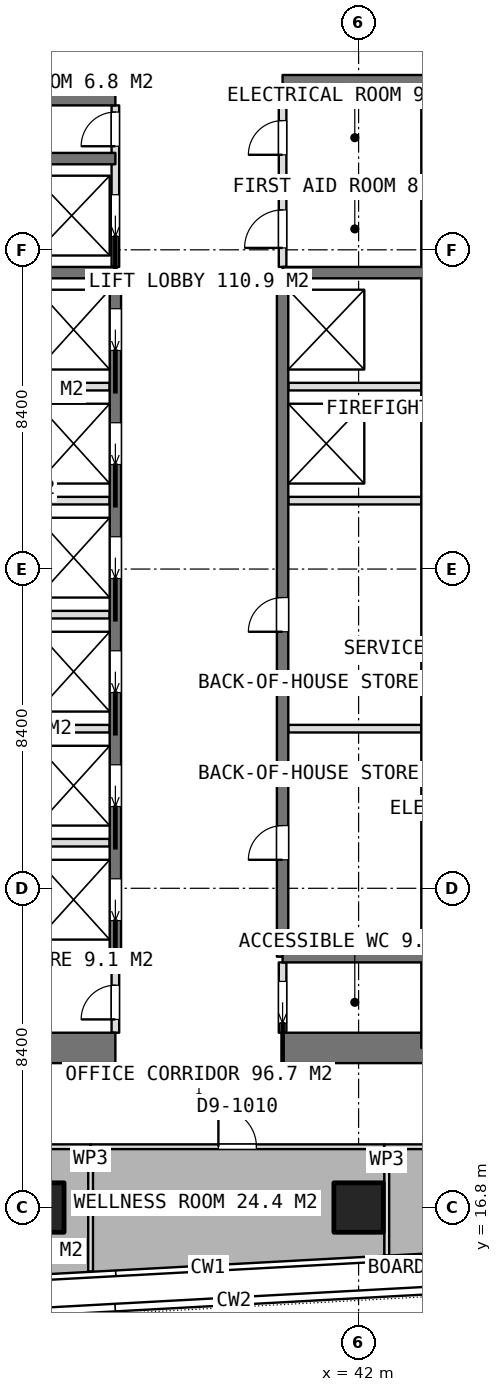
"""IFC4 building model, lengths in metres.
Left out: names, types, materials, properties, quantities, classifications, styles, units other than length and angle.
Written with IfcOpenShell. Run it as: python <this file> out.ifc"""

import sys

from ifc_helpers import new_model, si_unit, direction, frame, frame_2d, origin, origin_2d, place, context, subcontext, project, spatial, rectangle, extrude, element, fill, save


model = new_model("IFC4")
c1 = context("Model", 3, precision=1e-05, world=origin(), true_north=direction((0.0, 1.0)))
c2 = subcontext(c1, "Body", "Model", "MODEL_VIEW")
j1 = project(units=[si_unit("LENGTHUNIT", "METRE"), si_unit("PLANEANGLEUNIT", "RADIAN")], contexts=[c1])
p1 = place(None, origin())
s1 = spatial("IfcSite", under=j1, at=p1, CompositionType="ELEMENT")
p2 = place(p1, origin())
s2 = spatial("IfcBuilding", under=s1, at=p2, CompositionType="ELEMENT")
p3 = place(p2, frame((0.0, 0.0, 272.6)))
s3 = spatial("IfcBuildingStorey", under=s2, at=p3, CompositionType="ELEMENT", Elevation=272.6)
p4 = place(p3, frame((25.2, 21.0, 0.0), z_axis=(0.0, 0.0, 1.0), x_axis=(1.0, 0.0, 0.0)))
e1 = element("IfcWall", 1, at=p4, inside=s3, PredefinedType="SHEAR", context=c2, shape_type="SweptSolid", body=[
    extrude(rectangle(XDim=10.4, YDim=0.8, at=frame_2d((5.2, 0.0))), origin(), (0.0, 0.0, 1.0), 3.75),
])
p5 = place(p3, frame((40.0, 21.0, 0.0), z_axis=(0.0, 0.0, 1.0), x_axis=(1.0, 0.0, 0.0)))
e2 = element("IfcWall", 2, at=p5, inside=s3, PredefinedType="SHEAR", context=c2, shape_type="SweptSolid", body=[
    extrude(rectangle(XDim=10.4, YDim=0.8, at=frame_2d((5.2, 0.0))), origin(), (0.0, 0.0, 1.0), 3.75),
])
p6 = place(p3, frame((25.2, 46.2, 0.0), z_axis=(0.0, 0.0, 1.0), x_axis=(1.0, 0.0, 0.0)))
e3 = element("IfcWall", 3, at=p6, inside=s3, PredefinedType="SHEAR", context=c2, shape_type="SweptSolid", body=[
    extrude(rectangle(XDim=10.4, YDim=0.8, at=frame_2d((5.2, 0.0))), origin(), (0.0, 0.0, 1.0), 3.75),
])
p7 = place(p3, frame((40.0, 46.2, 0.0), z_axis=(0.0, 0.0, 1.0), x_axis=(1.0, 0.0, 0.0)))
e4 = element("IfcWall", 4, at=p7, inside=s3, PredefinedType="SHEAR", context=c2, shape_type="SweptSolid", body=[
    extrude(rectangle(XDim=10.4, YDim=0.8, at=frame_2d((5.2, 0.0))), origin(), (0.0, 0.0, 1.0), 3.75),
])
p8 = place(p3, frame((43.8, 21.0, 0.0), z_axis=(0.0, 0.0, 1.0), x_axis=(0.0, 1.0, 0.0)))
e5 = element("IfcWall", 5, at=p8, inside=s3, PredefinedType="SHEAR", context=c2, shape_type="SweptSolid", body=[
    extrude(rectangle(XDim=25.2, YDim=0.3, at=frame_2d((12.6, 0.0))), origin(), (0.0, 0.0, 1.0), 3.75),
])
p9 = place(p3, frame((35.6, 23.4, 0.0), z_axis=(0.0, 0.0, 1.0), x_axis=(0.0, 1.0, 0.0)))
e6 = element("IfcWall", 6, at=p9, inside=s3, PredefinedType="SHEAR", context=c2, shape_type="SweptSolid", body=[
    extrude(rectangle(XDim=18.0, YDim=0.3, at=frame_2d((9.0, 0.0))), origin(), (0.0, 0.0, 1.0), 3.75),
])
p10 = place(p9, frame((0.95, 0.0, 0.0)))
e7 = element("IfcOpeningElement", 7, at=p10, cuts=e6, PredefinedType="OPENING", context=c2, shape_type="SweptSolid", body=[
    extrude(rectangle(XDim=1.1, YDim=2.1, at=frame_2d((0.55, 1.05))), frame((0.0, 0.16, 0.0), z_axis=(0.0, -1.0, 0.0), x_axis=(1.0, 0.0, 0.0)), (0.0, 0.0, 1.0), 0.32),
])
p11 = place(p9, frame((3.95, 0.0, 0.0)))
e8 = element("IfcOpeningElement", 8, at=p11, cuts=e6, PredefinedType="OPENING", context=c2, shape_type="SweptSolid", body=[
    extrude(rectangle(XDim=1.1, YDim=2.1, at=frame_2d((0.55, 1.05))), frame((0.0, 0.16, 0.0), z_axis=(0.0, -1.0, 0.0), x_axis=(1.0, 0.0, 0.0)), (0.0, 0.0, 1.0), 0.32),
])
p12 = place(p9, frame((6.95, 0.0, 0.0)))
e9 = element("IfcOpeningElement", 9, at=p12, cuts=e6, PredefinedType="OPENING", context=c2, shape_type="SweptSolid", body=[
    extrude(rectangle(XDim=1.1, YDim=2.1, at=frame_2d((0.55, 1.05))), frame((0.0, 0.16, 0.0), z_axis=(0.0, -1.0, 0.0), x_axis=(1.0, 0.0, 0.0)), (0.0, 0.0, 1.0), 0.32),
])
p13 = place(p9, frame((9.95, 0.0, 0.0)))
e10 = element("IfcOpeningElement", 10, at=p13, cuts=e6, PredefinedType="OPENING", context=c2, shape_type="SweptSolid", body=[
    extrude(rectangle(XDim=1.1, YDim=2.1, at=frame_2d((0.55, 1.05))), frame((0.0, 0.16, 0.0), z_axis=(0.0, -1.0, 0.0), x_axis=(1.0, 0.0, 0.0)), (0.0, 0.0, 1.0), 0.32),
])
p14 = place(p9, frame((12.95, 0.0, 0.0)))
e11 = element("IfcOpeningElement", 11, at=p14, cuts=e6, PredefinedType="OPENING", context=c2, shape_type="SweptSolid", body=[
    extrude(rectangle(XDim=1.1, YDim=2.1, at=frame_2d((0.55, 1.05))), frame((0.0, 0.16, 0.0), z_axis=(0.0, -1.0, 0.0), x_axis=(1.0, 0.0, 0.0)), (0.0, 0.0, 1.0), 0.32),
])
p15 = place(p9, frame((15.95, 0.0, 0.0)))
e12 = element("IfcOpeningElement", 12, at=p15, cuts=e6, PredefinedType="OPENING", context=c2, shape_type="SweptSolid", body=[
    extrude(rectangle(XDim=1.1, YDim=2.1, at=frame_2d((0.55, 1.05))), frame((0.0, 0.16, 0.0), z_axis=(0.0, -1.0, 0.0), x_axis=(1.0, 0.0, 0.0)), (0.0, 0.0, 1.0), 0.32),
])
p16 = place(p3, frame((40.0, 23.4, 0.0), z_axis=(0.0, 0.0, 1.0), x_axis=(0.0, 1.0, 0.0)))
e13 = element("IfcWall", 13, at=p16, inside=s3, PredefinedType="SHEAR", context=c2, shape_type="SweptSolid", body=[
    extrude(rectangle(XDim=18.0, YDim=0.3, at=frame_2d((9.0, 0.0))), origin(), (0.0, 0.0, 1.0), 3.75),
])
p17 = place(p16, frame((2.55, 0.0, 0.0)))
e14 = element("IfcOpeningElement", 14, at=p17, cuts=e13, PredefinedType="OPENING", context=c2, shape_type="SweptSolid", body=[
    extrude(rectangle(XDim=0.9, YDim=2.1, at=frame_2d((0.45, 1.05))), frame((0.0, 0.16, 0.0), z_axis=(0.0, -1.0, 0.0), x_axis=(1.0, 0.0, 0.0)), (0.0, 0.0, 1.0), 0.32),
])
p18 = place(p16, frame((8.55, 0.0, 0.0)))
e15 = element("IfcOpeningElement", 15, at=p18, cuts=e13, PredefinedType="OPENING", context=c2, shape_type="SweptSolid", body=[
    extrude(rectangle(XDim=0.9, YDim=2.1, at=frame_2d((0.45, 1.05))), frame((0.0, 0.16, 0.0), z_axis=(0.0, -1.0, 0.0), x_axis=(1.0, 0.0, 0.0)), (0.0, 0.0, 1.0), 0.32),
])
for number, where, z_axis, x_axis in (
    (16, (31.8, 23.4, 0.0), (0.0, 0.0, 1.0), (1.0, 0.0, 0.0)),
    (17, (31.8, 41.4, 0.0), (0.0, 0.0, 1.0), (1.0, 0.0, 0.0)),
    (18, (31.8, 44.4, 0.0), (0.0, 0.0, 1.0), (1.0, 0.0, 0.0)),
    (19, (40.0, 23.4, 0.0), (0.0, 0.0, 1.0), (1.0, 0.0, 0.0)),
    (20, (40.0, 41.4, 0.0), (0.0, 0.0, 1.0), (1.0, 0.0, 0.0)),
):
    element("IfcWall", number, at=place(p3, frame(where, z_axis=z_axis, x_axis=x_axis)), inside=s3, PredefinedType="SHEAR", context=c2, shape_type="SweptSolid", body=[
        extrude(rectangle(XDim=3.8, YDim=0.3, at=frame_2d((1.9, 0.0))), origin(), (0.0, 0.0, 1.0), 3.75),
    ])
for number, where, z_axis, x_axis in (
    (21, (33.6, 16.8, 0.0), (0.0, 0.0, 1.0), (1.0, 0.0, 0.0)),
    (22, (42.0, 16.8, 0.0), (0.0, 0.0, 1.0), (1.0, 0.0, 0.0)),
):
    element("IfcColumn", number, at=place(p3, frame(where, z_axis=z_axis, x_axis=x_axis)), inside=s3, PredefinedType="COLUMN", context=c2, shape_type="SweptSolid", body=[
        extrude(rectangle(XDim=1.3, YDim=1.3, at=origin_2d()), origin(), (0.0, 0.0, 1.0), 3.75),
    ])
for number, where, z_axis, x_axis in (
    (23, (31.95, 26.4, 0.0), (0.0, 0.0, 1.0), (1.0, 0.0, 0.0)),
    (24, (31.95, 29.4, 0.0), (0.0, 0.0, 1.0), (1.0, 0.0, 0.0)),
    (25, (31.95, 32.4, 0.0), (0.0, 0.0, 1.0), (1.0, 0.0, 0.0)),
    (26, (31.95, 35.4, 0.0), (0.0, 0.0, 1.0), (1.0, 0.0, 0.0)),
    (27, (31.95, 38.4, 0.0), (0.0, 0.0, 1.0), (1.0, 0.0, 0.0)),
    (28, (40.15, 29.4, 0.0), (0.0, 0.0, 1.0), (1.0, 0.0, 0.0)),
    (29, (40.15, 35.4, 0.0), (0.0, 0.0, 1.0), (1.0, 0.0, 0.0)),
    (30, (40.15, 38.4, 0.0), (0.0, 0.0, 1.0), (1.0, 0.0, 0.0)),
):
    element("IfcWall", number, at=place(p3, frame(where, z_axis=z_axis, x_axis=x_axis)), inside=s3, PredefinedType="PARTITIONING", context=c2, shape_type="SweptSolid", body=[
        extrude(rectangle(XDim=3.5, YDim=0.2, at=frame_2d((1.75, 0.0))), origin(), (0.0, 0.0, 1.0), 3.5),
    ])
p19 = place(p3, frame((40.0, 21.4, 0.0), z_axis=(0.0, 0.0, 1.0), x_axis=(0.0, 1.0, 0.0)))
e31 = element("IfcWall", 31, at=p19, inside=s3, PredefinedType="PARTITIONING", context=c2, shape_type="SweptSolid", body=[
    extrude(rectangle(XDim=1.85, YDim=0.2, at=frame_2d((0.925, 0.0))), origin(), (0.0, 0.0, 1.0), 3.5),
])
p20 = place(p19, frame((0.25, 0.0, 0.0)))
e32 = element("IfcOpeningElement", 32, at=p20, cuts=e31, PredefinedType="OPENING", context=c2, shape_type="SweptSolid", body=[
    extrude(rectangle(XDim=1.1, YDim=2.1, at=frame_2d((0.55, 1.05))), frame((0.0, 0.11, 0.0), z_axis=(0.0, -1.0, 0.0), x_axis=(1.0, 0.0, 0.0)), (0.0, 0.0, 1.0), 0.22),
])
p21 = place(p3, frame((40.0, 41.55, 0.0), z_axis=(0.0, 0.0, 1.0), x_axis=(0.0, 1.0, 0.0)))
e33 = element("IfcWall", 33, at=p21, inside=s3, PredefinedType="PARTITIONING", context=c2, shape_type="SweptSolid", body=[
    extrude(rectangle(XDim=4.25, YDim=0.2, at=frame_2d((2.125, 0.0))), origin(), (0.0, 0.0, 1.0), 3.5),
])
p22 = place(p21, frame((2.95, 0.0, 0.0)))
e34 = element("IfcOpeningElement", 34, at=p22, cuts=e33, PredefinedType="OPENING", context=c2, shape_type="SweptSolid", body=[
    extrude(rectangle(XDim=0.9, YDim=2.1, at=frame_2d((0.45, 1.05))), frame((0.0, 0.11, 0.0), z_axis=(0.0, -1.0, 0.0), x_axis=(1.0, 0.0, 0.0)), (0.0, 0.0, 1.0), 0.22),
])
p23 = place(p21, frame((0.5, 0.0, 0.0)))
e35 = element("IfcOpeningElement", 35, at=p23, cuts=e33, PredefinedType="OPENING", context=c2, shape_type="SweptSolid", body=[
    extrude(rectangle(XDim=1.0, YDim=2.1, at=frame_2d((0.5, 1.05))), frame((0.0, 0.11, 0.0), z_axis=(0.0, -1.0, 0.0), x_axis=(1.0, 0.0, 0.0)), (0.0, 0.0, 1.0), 0.22),
])
p24 = place(p3, frame((35.6, 41.55, 0.0), z_axis=(0.0, 0.0, 1.0), x_axis=(0.0, 1.0, 0.0)))
e36 = element("IfcWall", 36, at=p24, inside=s3, PredefinedType="PARTITIONING", context=c2, shape_type="SweptSolid", body=[
    extrude(rectangle(XDim=4.25, YDim=0.2, at=frame_2d((2.125, 0.0))), origin(), (0.0, 0.0, 1.0), 3.5),
])
p25 = place(p24, frame((3.175, 0.0, 0.0)))
e37 = element("IfcOpeningElement", 37, at=p25, cuts=e36, PredefinedType="OPENING", context=c2, shape_type="SweptSolid", body=[
    extrude(rectangle(XDim=0.9, YDim=2.1, at=frame_2d((0.45, 1.05))), frame((0.0, 0.11, 0.0), z_axis=(0.0, -1.0, 0.0), x_axis=(1.0, 0.0, 0.0)), (0.0, 0.0, 1.0), 0.22),
])
p26 = place(p24, frame((0.8, 0.0, 0.0)))
e38 = element("IfcOpeningElement", 38, at=p26, cuts=e36, PredefinedType="OPENING", context=c2, shape_type="SweptSolid", body=[
    extrude(rectangle(XDim=1.1, YDim=2.1, at=frame_2d((0.55, 1.05))), frame((0.0, 0.11, 0.0), z_axis=(0.0, -1.0, 0.0), x_axis=(1.0, 0.0, 0.0)), (0.0, 0.0, 1.0), 0.22),
])
p27 = place(p3, frame((35.6, 21.4, 0.0), z_axis=(0.0, 0.0, 1.0), x_axis=(0.0, 1.0, 0.0)))
e39 = element("IfcWall", 39, at=p27, inside=s3, PredefinedType="PARTITIONING", context=c2, shape_type="SweptSolid", body=[
    extrude(rectangle(XDim=1.85, YDim=0.2, at=frame_2d((0.925, 0.0))), origin(), (0.0, 0.0, 1.0), 3.5),
])
p28 = place(p27, frame((0.35, 0.0, 0.0)))
e40 = element("IfcOpeningElement", 40, at=p28, cuts=e39, PredefinedType="OPENING", context=c2, shape_type="SweptSolid", body=[
    extrude(rectangle(XDim=0.9, YDim=2.1, at=frame_2d((0.45, 1.05))), frame((0.0, 0.11, 0.0), z_axis=(0.0, -1.0, 0.0), x_axis=(1.0, 0.0, 0.0)), (0.0, 0.0, 1.0), 0.22),
])
p29 = place(p3, frame((40.0, 43.7, 0.0), z_axis=(0.0, 0.0, 1.0), x_axis=(1.0, 0.0, 0.0)))
e41 = element("IfcWall", 41, at=p29, inside=s3, PredefinedType="PARTITIONING", context=c2, shape_type="SweptSolid", body=[
    extrude(rectangle(XDim=3.65, YDim=0.2, at=frame_2d((1.825, 0.0))), origin(), (0.0, 0.0, 1.0), 3.5),
])
p30 = place(p3, frame((34.948, 15.114, 0.0), z_axis=(0.0, 0.0, 1.0), x_axis=(0.0, 1.0, 0.0)))
e42 = element("IfcWall", 42, at=p30, inside=s3, PredefinedType="PARTITIONING", context=c2, shape_type="SweptSolid", body=[
    extrude(rectangle(XDim=3.286, YDim=0.125, at=frame_2d((1.643, 0.0))), origin(), (0.0, 0.0, 1.0), 3.5),
])
p31 = place(p3, frame((34.948, 18.4, 0.0), z_axis=(0.0, 0.0, 1.0), x_axis=(1.0, 0.0, 0.0)))
e43 = element("IfcWall", 43, at=p31, inside=s3, PredefinedType="PARTITIONING", context=c2, shape_type="SweptSolid", body=[
    extrude(rectangle(XDim=7.725, YDim=0.125, at=frame_2d((3.863, 0.0))), origin(), (0.0, 0.0, 1.0), 3.5),
])
p32 = place(p31, frame((3.363, 0.0, 0.0)))
e44 = element("IfcOpeningElement", 44, at=p32, cuts=e43, PredefinedType="OPENING", context=c2, shape_type="SweptSolid", body=[
    extrude(rectangle(XDim=1.0, YDim=2.1, at=frame_2d((0.5, 1.05))), frame((0.0, 0.073, 0.0), z_axis=(0.0, -1.0, 0.0), x_axis=(1.0, 0.0, 0.0)), (0.0, 0.0, 1.0), 0.145),
])
p33 = place(p3, frame((42.742, 18.337, 0.0), z_axis=(0.0, 0.0, 1.0), x_axis=(0.0, -1.0, 0.0)))
e45 = element("IfcWall", 45, at=p33, inside=s3, PredefinedType="PARTITIONING", context=c2, shape_type="SweptSolid", body=[
    extrude(rectangle(XDim=2.799, YDim=0.125, at=frame_2d((1.399, 0.0))), origin(), (0.0, 0.0, 1.0), 3.5),
])
p34 = place(p3, frame((42.674, 18.4, 0.0), z_axis=(0.0, 0.0, 1.0), x_axis=(1.0, 0.0, 0.0)))
e46 = element("IfcWall", 46, at=p34, inside=s3, PredefinedType="PARTITIONING", context=c2, shape_type="SweptSolid", body=[
    extrude(rectangle(XDim=7.726, YDim=0.125, at=frame_2d((3.863, 0.0))), origin(), (0.0, 0.0, 1.0), 3.5),
])
p35 = place(p34, frame((3.363, 0.0, 0.0)))
e47 = element("IfcOpeningElement", 47, at=p35, cuts=e46, PredefinedType="OPENING", context=c2, shape_type="SweptSolid", body=[
    extrude(rectangle(XDim=1.0, YDim=2.1, at=frame_2d((0.5, 1.05))), frame((0.0, 0.073, 0.0), z_axis=(0.0, -1.0, 0.0), x_axis=(1.0, 0.0, 0.0)), (0.0, 0.0, 1.0), 0.145),
])
p36 = place(p3, frame((25.207, 18.4, 0.0), z_axis=(0.0, 0.0, 1.0), x_axis=(1.0, 0.0, 0.0)))
e48 = element("IfcWall", 48, at=p36, inside=s3, PredefinedType="PARTITIONING", context=c2, shape_type="SweptSolid", body=[
    extrude(rectangle(XDim=9.74, YDim=0.125, at=frame_2d((4.87, 0.0))), origin(), (0.0, 0.0, 1.0), 3.5),
])
p37 = place(p36, frame((4.37, 0.0, 0.0)))
e49 = element("IfcOpeningElement", 49, at=p37, cuts=e48, PredefinedType="OPENING", context=c2, shape_type="SweptSolid", body=[
    extrude(rectangle(XDim=1.0, YDim=2.1, at=frame_2d((0.5, 1.05))), frame((0.0, 0.073, 0.0), z_axis=(0.0, -1.0, 0.0), x_axis=(1.0, 0.0, 0.0)), (0.0, 0.0, 1.0), 0.145),
])
p38 = place(p20, origin())
e50 = element("IfcDoor", 50, at=p38, inside=s3, OperationType="SLIDING_TO_LEFT", PredefinedType="DOOR", context=c2, shape_type="SweptSolid", body=[
    extrude(rectangle(XDim=1.1, YDim=2.1, at=frame_2d((0.55, 1.05))), frame((0.0, 0.025, 0.0), z_axis=(0.0, -1.0, 0.0), x_axis=(1.0, 0.0, 0.0)), (0.0, 0.0, 1.0), 0.05),
])
fill(e32, e50)
p39 = place(p28, origin())
e51 = element("IfcDoor", 51, at=p39, inside=s3, OperationType="SINGLE_SWING_LEFT", PredefinedType="DOOR", context=c2, shape_type="SweptSolid", body=[
    extrude(rectangle(XDim=0.9, YDim=2.1, at=frame_2d((0.45, 1.05))), frame((0.0, 0.025, 0.0), z_axis=(0.0, -1.0, 0.0), x_axis=(1.0, 0.0, 0.0)), (0.0, 0.0, 1.0), 0.05),
])
fill(e40, e51)
p40 = place(p22, origin())
e52 = element("IfcDoor", 52, at=p40, inside=s3, OperationType="SINGLE_SWING_LEFT", PredefinedType="DOOR", context=c2, shape_type="SweptSolid", body=[
    extrude(rectangle(XDim=0.9, YDim=2.1, at=frame_2d((0.45, 1.05))), frame((0.0, 0.025, 0.0), z_axis=(0.0, -1.0, 0.0), x_axis=(1.0, 0.0, 0.0)), (0.0, 0.0, 1.0), 0.05),
])
fill(e34, e52)
p41 = place(p23, origin())
e53 = element("IfcDoor", 53, at=p41, inside=s3, OperationType="SINGLE_SWING_LEFT", PredefinedType="DOOR", context=c2, shape_type="SweptSolid", body=[
    extrude(rectangle(XDim=1.0, YDim=2.1, at=frame_2d((0.5, 1.05))), frame((0.0, 0.025, 0.0), z_axis=(0.0, -1.0, 0.0), x_axis=(1.0, 0.0, 0.0)), (0.0, 0.0, 1.0), 0.05),
])
fill(e35, e53)
p42 = place(p17, origin())
e54 = element("IfcDoor", 54, at=p42, inside=s3, OperationType="SINGLE_SWING_LEFT", PredefinedType="DOOR", context=c2, shape_type="SweptSolid", body=[
    extrude(rectangle(XDim=0.9, YDim=2.1, at=frame_2d((0.45, 1.05))), frame((0.0, 0.025, 0.0), z_axis=(0.0, -1.0, 0.0), x_axis=(1.0, 0.0, 0.0)), (0.0, 0.0, 1.0), 0.05),
])
fill(e14, e54)
p43 = place(p18, origin())
e55 = element("IfcDoor", 55, at=p43, inside=s3, OperationType="SINGLE_SWING_LEFT", PredefinedType="DOOR", context=c2, shape_type="SweptSolid", body=[
    extrude(rectangle(XDim=0.9, YDim=2.1, at=frame_2d((0.45, 1.05))), frame((0.0, 0.025, 0.0), z_axis=(0.0, -1.0, 0.0), x_axis=(1.0, 0.0, 0.0)), (0.0, 0.0, 1.0), 0.05),
])
fill(e15, e55)
p44 = place(p25, origin())
e56 = element("IfcDoor", 56, at=p44, inside=s3, OperationType="SINGLE_SWING_LEFT", PredefinedType="DOOR", context=c2, shape_type="SweptSolid", body=[
    extrude(rectangle(XDim=0.9, YDim=2.1, at=frame_2d((0.45, 1.05))), frame((0.0, 0.025, 0.0), z_axis=(0.0, -1.0, 0.0), x_axis=(1.0, 0.0, 0.0)), (0.0, 0.0, 1.0), 0.05),
])
fill(e37, e56)
p45 = place(p10, origin())
e57 = element("IfcDoor", 57, at=p45, inside=s3, OperationType="SLIDING_TO_LEFT", PredefinedType="USERDEFINED", context=c2, shape_type="SweptSolid", body=[
    extrude(rectangle(XDim=1.1, YDim=2.1, at=frame_2d((0.55, 1.05))), frame((0.0, 0.025, 0.0), z_axis=(0.0, -1.0, 0.0), x_axis=(1.0, 0.0, 0.0)), (0.0, 0.0, 1.0), 0.05),
])
fill(e7, e57)
p46 = place(p11, origin())
e58 = element("IfcDoor", 58, at=p46, inside=s3, OperationType="SLIDING_TO_LEFT", PredefinedType="USERDEFINED", context=c2, shape_type="SweptSolid", body=[
    extrude(rectangle(XDim=1.1, YDim=2.1, at=frame_2d((0.55, 1.05))), frame((0.0, 0.025, 0.0), z_axis=(0.0, -1.0, 0.0), x_axis=(1.0, 0.0, 0.0)), (0.0, 0.0, 1.0), 0.05),
])
fill(e8, e58)
p47 = place(p12, origin())
e59 = element("IfcDoor", 59, at=p47, inside=s3, OperationType="SLIDING_TO_LEFT", PredefinedType="USERDEFINED", context=c2, shape_type="SweptSolid", body=[
    extrude(rectangle(XDim=1.1, YDim=2.1, at=frame_2d((0.55, 1.05))), frame((0.0, 0.025, 0.0), z_axis=(0.0, -1.0, 0.0), x_axis=(1.0, 0.0, 0.0)), (0.0, 0.0, 1.0), 0.05),
])
fill(e9, e59)
p48 = place(p13, origin())
e60 = element("IfcDoor", 60, at=p48, inside=s3, OperationType="SLIDING_TO_LEFT", PredefinedType="USERDEFINED", context=c2, shape_type="SweptSolid", body=[
    extrude(rectangle(XDim=1.1, YDim=2.1, at=frame_2d((0.55, 1.05))), frame((0.0, 0.025, 0.0), z_axis=(0.0, -1.0, 0.0), x_axis=(1.0, 0.0, 0.0)), (0.0, 0.0, 1.0), 0.05),
])
fill(e10, e60)
p49 = place(p14, origin())
e61 = element("IfcDoor", 61, at=p49, inside=s3, OperationType="SLIDING_TO_LEFT", PredefinedType="USERDEFINED", context=c2, shape_type="SweptSolid", body=[
    extrude(rectangle(XDim=1.1, YDim=2.1, at=frame_2d((0.55, 1.05))), frame((0.0, 0.025, 0.0), z_axis=(0.0, -1.0, 0.0), x_axis=(1.0, 0.0, 0.0)), (0.0, 0.0, 1.0), 0.05),
])
fill(e11, e61)
p50 = place(p15, origin())
e62 = element("IfcDoor", 62, at=p50, inside=s3, OperationType="SLIDING_TO_LEFT", PredefinedType="USERDEFINED", context=c2, shape_type="SweptSolid", body=[
    extrude(rectangle(XDim=1.1, YDim=2.1, at=frame_2d((0.55, 1.05))), frame((0.0, 0.025, 0.0), z_axis=(0.0, -1.0, 0.0), x_axis=(1.0, 0.0, 0.0)), (0.0, 0.0, 1.0), 0.05),
])
fill(e12, e62)
p51 = place(p26, origin())
e63 = element("IfcDoor", 63, at=p51, inside=s3, OperationType="SLIDING_TO_LEFT", PredefinedType="USERDEFINED", context=c2, shape_type="SweptSolid", body=[
    extrude(rectangle(XDim=1.1, YDim=2.1, at=frame_2d((0.55, 1.05))), frame((0.0, 0.025, 0.0), z_axis=(0.0, -1.0, 0.0), x_axis=(1.0, 0.0, 0.0)), (0.0, 0.0, 1.0), 0.05),
])
fill(e38, e63)
p52 = place(p32, origin())
e64 = element("IfcDoor", 64, at=p52, inside=s3, OperationType="SINGLE_SWING_LEFT", PredefinedType="DOOR", context=c2, shape_type="SweptSolid", body=[
    extrude(rectangle(XDim=1.0, YDim=2.1, at=frame_2d((0.5, 1.05))), frame((0.0, 0.025, 0.0), z_axis=(0.0, -1.0, 0.0), x_axis=(1.0, 0.0, 0.0)), (0.0, 0.0, 1.0), 0.05),
])
fill(e44, e64)
save(model, sys.argv[1])
